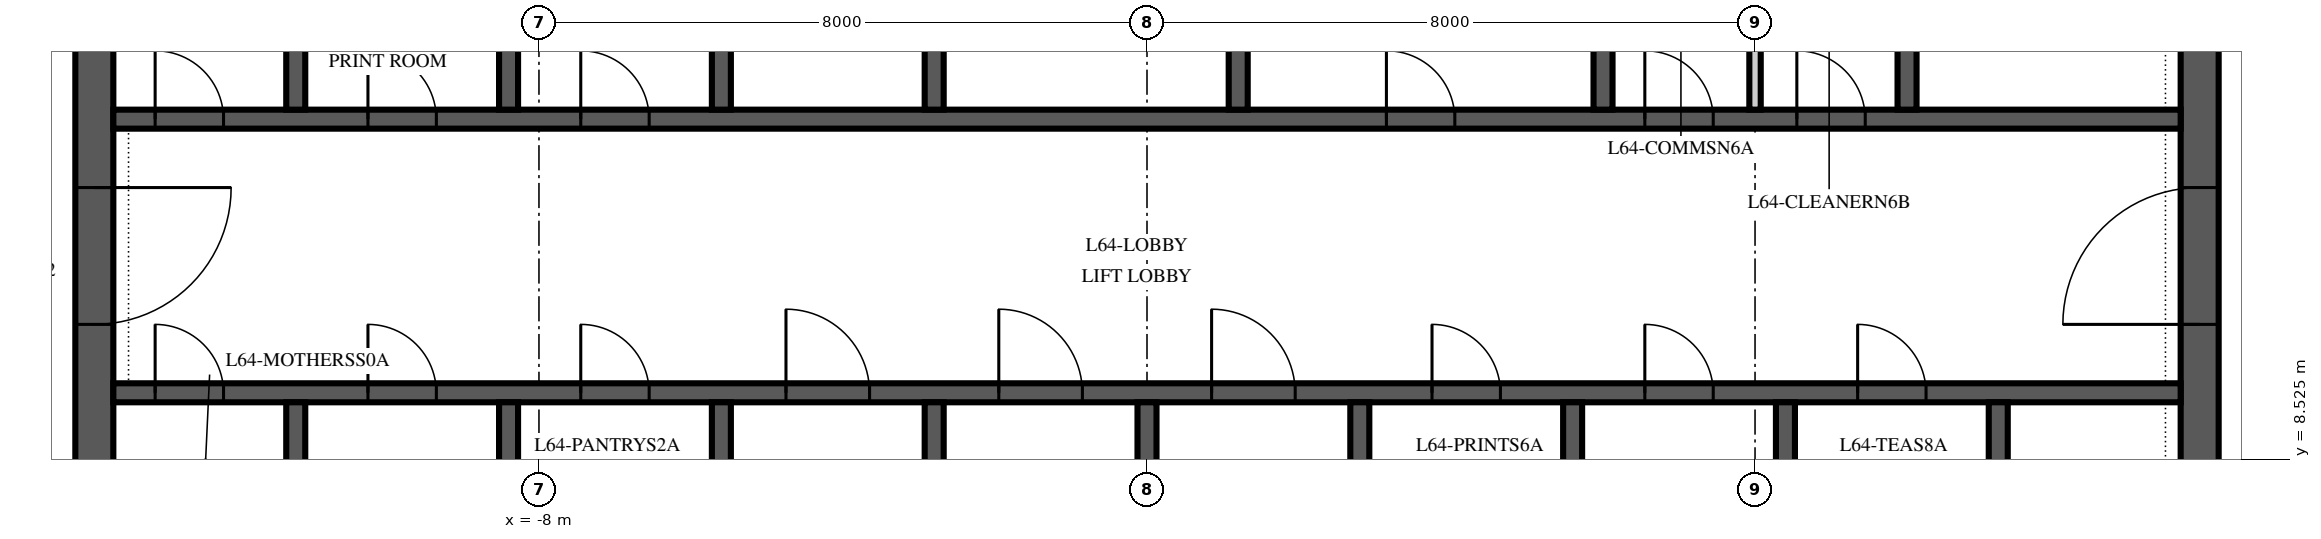
"""IFC4 building model, lengths in metres.
Left out: names, types, materials, properties, quantities, classifications, styles, units other than length and angle.
Written with IfcOpenShell. Run it as: python <this file> out.ifc"""

import sys

from ifc_helpers import new_model, si_unit, direction, frame, frame_2d, origin, place, context, subcontext, project, spatial, polyline, rectangle, outline, extrude, element, fill, save


model = new_model("IFC4")
c1 = context("Model", 3, precision=1e-05, world=origin(), true_north=direction((0.0, 1.0)))
c2 = subcontext(c1, "Body", "Model", "MODEL_VIEW")
j1 = project(units=[si_unit("LENGTHUNIT", "METRE"), si_unit("PLANEANGLEUNIT", "RADIAN")], contexts=[c1])
p1 = place(None, origin())
s1 = spatial("IfcSite", under=j1, at=p1, CompositionType="ELEMENT")
p2 = place(p1, origin())
s2 = spatial("IfcBuilding", under=s1, at=p2, CompositionType="ELEMENT")
p3 = place(p2, frame((0.0, 0.0, 276.0)))
s3 = spatial("IfcBuildingStorey", under=s2, at=p3, CompositionType="ELEMENT", Elevation=276.0)
p4 = place(p3, frame((13.85, 6.15, 0.0), z_axis=(0.0, 0.0, 1.0), x_axis=(0.0, 1.0, 0.0)))
e1 = element("IfcWall", 1, at=p4, inside=s3, PredefinedType="SHEAR", context=c2, shape_type="SweptSolid", body=[
    extrude(outline(polyline([(0.0, -0.25), (17.7, -0.25), (17.7, 0.0), (17.45, 0.0), (17.45, 0.25), (0.25, 0.25), (0.25, 0.0), (0.0, 0.0), (0.0, -0.25)])), origin(), (0.0, 0.0, 1.0), 4.0),
])
p5 = place(p4, frame((4.15, 0.0, 0.0)))
e2 = element("IfcOpeningElement", 2, at=p5, cuts=e1, PredefinedType="OPENING", context=c2, shape_type="SweptSolid", body=[
    extrude(rectangle(XDim=1.8, YDim=2.4, at=frame_2d((0.9, 1.2))), frame((0.0, 0.265, 0.0), z_axis=(0.0, -1.0, 0.0), x_axis=(1.0, 0.0, 0.0)), (0.0, 0.0, 1.0), 0.53),
])
p6 = place(p3, frame((-13.85, 23.85, 0.0), z_axis=(0.0, 0.0, 1.0), x_axis=(0.0, -1.0, 0.0)))
e3 = element("IfcWall", 3, at=p6, inside=s3, PredefinedType="SHEAR", context=c2, shape_type="SweptSolid", body=[
    extrude(outline(polyline([(0.0, -0.25), (17.7, -0.25), (17.7, 0.0), (17.45, 0.0), (17.45, 0.25), (0.25, 0.25), (0.25, 0.0), (0.0, 0.0), (0.0, -0.25)])), origin(), (0.0, 0.0, 1.0), 4.0),
])
p7 = place(p6, frame((11.75, 0.0, 0.0)))
e4 = element("IfcOpeningElement", 4, at=p7, cuts=e3, PredefinedType="OPENING", context=c2, shape_type="SweptSolid", body=[
    extrude(rectangle(XDim=1.8, YDim=2.4, at=frame_2d((0.9, 1.2))), frame((0.0, 0.265, 0.0), z_axis=(0.0, -1.0, 0.0), x_axis=(1.0, 0.0, 0.0)), (0.0, 0.0, 1.0), 0.53),
])
p8 = place(p3, frame((-13.6, 9.4, 0.0), z_axis=(0.0, 0.0, 1.0), x_axis=(1.0, 0.0, 0.0)))
e5 = element("IfcWall", 5, at=p8, inside=s3, PredefinedType="SHEAR", context=c2, shape_type="SweptSolid", body=[
    extrude(rectangle(XDim=27.2, YDim=0.25, at=frame_2d((13.6, 0.0))), origin(), (0.0, 0.0, 1.0), 4.0),
])
p9 = place(p8, frame((8.85, 0.0, 0.0)))
e6 = element("IfcOpeningElement", 6, at=p9, cuts=e5, PredefinedType="OPENING", context=c2, shape_type="SweptSolid", body=[
    extrude(rectangle(XDim=1.1, YDim=2.1, at=frame_2d((0.55, 1.05))), frame((0.0, 0.14, 0.0), z_axis=(0.0, -1.0, 0.0), x_axis=(1.0, 0.0, 0.0)), (0.0, 0.0, 1.0), 0.28),
])
p10 = place(p8, frame((11.65, 0.0, 0.0)))
e7 = element("IfcOpeningElement", 7, at=p10, cuts=e5, PredefinedType="OPENING", context=c2, shape_type="SweptSolid", body=[
    extrude(rectangle(XDim=1.1, YDim=2.1, at=frame_2d((0.55, 1.05))), frame((0.0, 0.14, 0.0), z_axis=(0.0, -1.0, 0.0), x_axis=(1.0, 0.0, 0.0)), (0.0, 0.0, 1.0), 0.28),
])
p11 = place(p8, frame((14.45, 0.0, 0.0)))
e8 = element("IfcOpeningElement", 8, at=p11, cuts=e5, PredefinedType="OPENING", context=c2, shape_type="SweptSolid", body=[
    extrude(rectangle(XDim=1.1, YDim=2.1, at=frame_2d((0.55, 1.05))), frame((0.0, 0.14, 0.0), z_axis=(0.0, -1.0, 0.0), x_axis=(1.0, 0.0, 0.0)), (0.0, 0.0, 1.0), 0.28),
])
p12 = place(p8, frame((0.55, 0.0, 0.0)))
e9 = element("IfcOpeningElement", 9, at=p12, cuts=e5, PredefinedType="OPENING", context=c2, shape_type="SweptSolid", body=[
    extrude(rectangle(XDim=0.9, YDim=2.1, at=frame_2d((0.45, 1.05))), frame((0.0, 0.14, 0.0), z_axis=(0.0, -1.0, 0.0), x_axis=(1.0, 0.0, 0.0)), (0.0, 0.0, 1.0), 0.28),
])
p13 = place(p8, frame((3.35, 0.0, 0.0)))
e10 = element("IfcOpeningElement", 10, at=p13, cuts=e5, PredefinedType="OPENING", context=c2, shape_type="SweptSolid", body=[
    extrude(rectangle(XDim=0.9, YDim=2.1, at=frame_2d((0.45, 1.05))), frame((0.0, 0.14, 0.0), z_axis=(0.0, -1.0, 0.0), x_axis=(1.0, 0.0, 0.0)), (0.0, 0.0, 1.0), 0.28),
])
p14 = place(p8, frame((6.15, 0.0, 0.0)))
e11 = element("IfcOpeningElement", 11, at=p14, cuts=e5, PredefinedType="OPENING", context=c2, shape_type="SweptSolid", body=[
    extrude(rectangle(XDim=0.9, YDim=2.1, at=frame_2d((0.45, 1.05))), frame((0.0, 0.14, 0.0), z_axis=(0.0, -1.0, 0.0), x_axis=(1.0, 0.0, 0.0)), (0.0, 0.0, 1.0), 0.28),
])
p15 = place(p8, frame((17.35, 0.0, 0.0)))
e12 = element("IfcOpeningElement", 12, at=p15, cuts=e5, PredefinedType="OPENING", context=c2, shape_type="SweptSolid", body=[
    extrude(rectangle(XDim=0.9, YDim=2.1, at=frame_2d((0.45, 1.05))), frame((0.0, 0.14, 0.0), z_axis=(0.0, -1.0, 0.0), x_axis=(1.0, 0.0, 0.0)), (0.0, 0.0, 1.0), 0.28),
])
p16 = place(p8, frame((20.15, 0.0, 0.0)))
e13 = element("IfcOpeningElement", 13, at=p16, cuts=e5, PredefinedType="OPENING", context=c2, shape_type="SweptSolid", body=[
    extrude(rectangle(XDim=0.9, YDim=2.1, at=frame_2d((0.45, 1.05))), frame((0.0, 0.14, 0.0), z_axis=(0.0, -1.0, 0.0), x_axis=(1.0, 0.0, 0.0)), (0.0, 0.0, 1.0), 0.28),
])
p17 = place(p8, frame((22.95, 0.0, 0.0)))
e14 = element("IfcOpeningElement", 14, at=p17, cuts=e5, PredefinedType="OPENING", context=c2, shape_type="SweptSolid", body=[
    extrude(rectangle(XDim=0.9, YDim=2.1, at=frame_2d((0.45, 1.05))), frame((0.0, 0.14, 0.0), z_axis=(0.0, -1.0, 0.0), x_axis=(1.0, 0.0, 0.0)), (0.0, 0.0, 1.0), 0.28),
])
p18 = place(p3, frame((-13.6, 13.0, 0.0), z_axis=(0.0, 0.0, 1.0), x_axis=(1.0, 0.0, 0.0)))
e15 = element("IfcWall", 15, at=p18, inside=s3, PredefinedType="SHEAR", context=c2, shape_type="SweptSolid", body=[
    extrude(rectangle(XDim=27.2, YDim=0.25, at=frame_2d((13.6, 0.0))), origin(), (0.0, 0.0, 1.0), 4.0),
])
p19 = place(p18, frame((16.75, 0.0, 0.0)))
e16 = element("IfcOpeningElement", 16, at=p19, cuts=e15, PredefinedType="OPENING", context=c2, shape_type="SweptSolid", body=[
    extrude(rectangle(XDim=0.9, YDim=2.1, at=frame_2d((0.45, 1.05))), frame((0.0, 0.14, 0.0), z_axis=(0.0, -1.0, 0.0), x_axis=(1.0, 0.0, 0.0)), (0.0, 0.0, 1.0), 0.28),
])
p20 = place(p18, frame((20.15, 0.0, 0.0)))
e17 = element("IfcOpeningElement", 17, at=p20, cuts=e15, PredefinedType="OPENING", context=c2, shape_type="SweptSolid", body=[
    extrude(rectangle(XDim=0.9, YDim=2.1, at=frame_2d((0.45, 1.05))), frame((0.0, 0.14, 0.0), z_axis=(0.0, -1.0, 0.0), x_axis=(1.0, 0.0, 0.0)), (0.0, 0.0, 1.0), 0.28),
])
p21 = place(p18, frame((22.15, 0.0, 0.0)))
e18 = element("IfcOpeningElement", 18, at=p21, cuts=e15, PredefinedType="OPENING", context=c2, shape_type="SweptSolid", body=[
    extrude(rectangle(XDim=0.9, YDim=2.1, at=frame_2d((0.45, 1.05))), frame((0.0, 0.14, 0.0), z_axis=(0.0, -1.0, 0.0), x_axis=(1.0, 0.0, 0.0)), (0.0, 0.0, 1.0), 0.28),
])
p22 = place(p18, frame((0.55, 0.0, 0.0)))
e19 = element("IfcOpeningElement", 19, at=p22, cuts=e15, PredefinedType="OPENING", context=c2, shape_type="SweptSolid", body=[
    extrude(rectangle(XDim=0.9, YDim=2.1, at=frame_2d((0.45, 1.05))), frame((0.0, 0.14, 0.0), z_axis=(0.0, -1.0, 0.0), x_axis=(1.0, 0.0, 0.0)), (0.0, 0.0, 1.0), 0.28),
])
p23 = place(p18, frame((3.35, 0.0, 0.0)))
e20 = element("IfcOpeningElement", 20, at=p23, cuts=e15, PredefinedType="OPENING", context=c2, shape_type="SweptSolid", body=[
    extrude(rectangle(XDim=0.9, YDim=2.1, at=frame_2d((0.45, 1.05))), frame((0.0, 0.14, 0.0), z_axis=(0.0, -1.0, 0.0), x_axis=(1.0, 0.0, 0.0)), (0.0, 0.0, 1.0), 0.28),
])
p24 = place(p18, frame((6.15, 0.0, 0.0)))
e21 = element("IfcOpeningElement", 21, at=p24, cuts=e15, PredefinedType="OPENING", context=c2, shape_type="SweptSolid", body=[
    extrude(rectangle(XDim=0.9, YDim=2.1, at=frame_2d((0.45, 1.05))), frame((0.0, 0.14, 0.0), z_axis=(0.0, -1.0, 0.0), x_axis=(1.0, 0.0, 0.0)), (0.0, 0.0, 1.0), 0.28),
])
for number, where, z_axis, x_axis in (
    (22, (-11.2, 6.4, 0.0), (0.0, 0.0, 1.0), (0.0, 1.0, 0.0)),
    (23, (-8.4, 6.4, 0.0), (0.0, 0.0, 1.0), (0.0, 1.0, 0.0)),
    (24, (-5.6, 6.4, 0.0), (0.0, 0.0, 1.0), (0.0, 1.0, 0.0)),
    (25, (-2.8, 6.4, 0.0), (0.0, 0.0, 1.0), (0.0, 1.0, 0.0)),
    (26, (0.0, 6.4, 0.0), (0.0, 0.0, 1.0), (0.0, 1.0, 0.0)),
    (27, (2.8, 6.4, 0.0), (0.0, 0.0, 1.0), (0.0, 1.0, 0.0)),
    (28, (5.6, 6.4, 0.0), (0.0, 0.0, 1.0), (0.0, 1.0, 0.0)),
    (29, (8.4, 6.4, 0.0), (0.0, 0.0, 1.0), (0.0, 1.0, 0.0)),
    (30, (11.2, 6.4, 0.0), (0.0, 0.0, 1.0), (0.0, 1.0, 0.0)),
):
    element("IfcWall", number, at=place(p3, frame(where, z_axis=z_axis, x_axis=x_axis)), inside=s3, PredefinedType="SHEAR", context=c2, shape_type="SweptSolid", body=[
        extrude(rectangle(XDim=2.875, YDim=0.25, at=frame_2d((1.438, 0.0))), origin(), (0.0, 0.0, 1.0), 4.0),
    ])
for number, where, z_axis, x_axis in (
    (31, (-11.2, 13.125, 0.0), (0.0, 0.0, 1.0), (0.0, 1.0, 0.0)),
    (32, (-8.4, 13.125, 0.0), (0.0, 0.0, 1.0), (0.0, 1.0, 0.0)),
    (33, (-5.6, 13.125, 0.0), (0.0, 0.0, 1.0), (0.0, 1.0, 0.0)),
    (34, (-2.8, 13.125, 0.0), (0.0, 0.0, 1.0), (0.0, 1.0, 0.0)),
    (35, (1.2, 13.125, 0.0), (0.0, 0.0, 1.0), (0.0, 1.0, 0.0)),
    (36, (6.0, 13.125, 0.0), (0.0, 0.0, 1.0), (0.0, 1.0, 0.0)),
    (37, (10.0, 13.125, 0.0), (0.0, 0.0, 1.0), (0.0, 1.0, 0.0)),
):
    element("IfcWall", number, at=place(p3, frame(where, z_axis=z_axis, x_axis=x_axis)), inside=s3, PredefinedType="SHEAR", context=c2, shape_type="SweptSolid", body=[
        extrude(rectangle(XDim=2.75, YDim=0.25, at=frame_2d((1.375, 0.0))), origin(), (0.0, 0.0, 1.0), 4.0),
    ])
p25 = place(p3, frame((8.0, 13.125, 0.0), z_axis=(0.0, 0.0, 1.0), x_axis=(0.0, 1.0, 0.0)))
e38 = element("IfcWall", 38, at=p25, inside=s3, PredefinedType="PARTITIONING", context=c2, shape_type="SweptSolid", body=[
    extrude(rectangle(XDim=2.75, YDim=0.15, at=frame_2d((1.375, 0.0))), origin(), (0.0, 0.0, 1.0), 3.85),
])
p26 = place(p5, origin())
e39 = element("IfcDoor", 39, at=p26, inside=s3, OperationType="DOUBLE_DOOR_SINGLE_SWING", PredefinedType="DOOR", context=c2, shape_type="SweptSolid", body=[
    extrude(rectangle(XDim=1.8, YDim=2.4, at=frame_2d((0.9, 1.2))), frame((0.0, 0.25, 0.0), z_axis=(0.0, -1.0, 0.0), x_axis=(1.0, 0.0, 0.0)), (0.0, 0.0, 1.0), 0.5),
])
fill(e2, e39)
p27 = place(p7, origin())
e40 = element("IfcDoor", 40, at=p27, inside=s3, OperationType="DOUBLE_DOOR_SINGLE_SWING", PredefinedType="DOOR", context=c2, shape_type="SweptSolid", body=[
    extrude(rectangle(XDim=1.8, YDim=2.4, at=frame_2d((0.9, 1.2))), frame((0.0, 0.25, 0.0), z_axis=(0.0, -1.0, 0.0), x_axis=(1.0, 0.0, 0.0)), (0.0, 0.0, 1.0), 0.5),
])
fill(e4, e40)
p28 = place(p9, origin())
e41 = element("IfcDoor", 41, at=p28, inside=s3, OperationType="SLIDING_TO_LEFT", PredefinedType="DOOR", context=c2, shape_type="SweptSolid", body=[
    extrude(rectangle(XDim=1.1, YDim=2.1, at=frame_2d((0.55, 1.05))), frame((0.0, 0.125, 0.0), z_axis=(0.0, -1.0, 0.0), x_axis=(1.0, 0.0, 0.0)), (0.0, 0.0, 1.0), 0.25),
])
fill(e6, e41)
p29 = place(p10, origin())
e42 = element("IfcDoor", 42, at=p29, inside=s3, OperationType="SLIDING_TO_LEFT", PredefinedType="DOOR", context=c2, shape_type="SweptSolid", body=[
    extrude(rectangle(XDim=1.1, YDim=2.1, at=frame_2d((0.55, 1.05))), frame((0.0, 0.125, 0.0), z_axis=(0.0, -1.0, 0.0), x_axis=(1.0, 0.0, 0.0)), (0.0, 0.0, 1.0), 0.25),
])
fill(e7, e42)
p30 = place(p11, origin())
e43 = element("IfcDoor", 43, at=p30, inside=s3, OperationType="SLIDING_TO_LEFT", PredefinedType="DOOR", context=c2, shape_type="SweptSolid", body=[
    extrude(rectangle(XDim=1.1, YDim=2.1, at=frame_2d((0.55, 1.05))), frame((0.0, 0.125, 0.0), z_axis=(0.0, -1.0, 0.0), x_axis=(1.0, 0.0, 0.0)), (0.0, 0.0, 1.0), 0.25),
])
fill(e8, e43)
p31 = place(p19, origin())
e44 = element("IfcDoor", 44, at=p31, inside=s3, OperationType="SINGLE_SWING_LEFT", PredefinedType="DOOR", context=c2, shape_type="SweptSolid", body=[
    extrude(rectangle(XDim=0.9, YDim=2.1, at=frame_2d((0.45, 1.05))), frame((0.0, 0.125, 0.0), z_axis=(0.0, -1.0, 0.0), x_axis=(1.0, 0.0, 0.0)), (0.0, 0.0, 1.0), 0.25),
])
fill(e16, e44)
p32 = place(p20, origin())
e45 = element("IfcDoor", 45, at=p32, inside=s3, OperationType="SINGLE_SWING_LEFT", PredefinedType="DOOR", context=c2, shape_type="SweptSolid", body=[
    extrude(rectangle(XDim=0.9, YDim=2.1, at=frame_2d((0.45, 1.05))), frame((0.0, 0.125, 0.0), z_axis=(0.0, -1.0, 0.0), x_axis=(1.0, 0.0, 0.0)), (0.0, 0.0, 1.0), 0.25),
])
fill(e17, e45)
p33 = place(p21, origin())
e46 = element("IfcDoor", 46, at=p33, inside=s3, OperationType="SINGLE_SWING_LEFT", PredefinedType="DOOR", context=c2, shape_type="SweptSolid", body=[
    extrude(rectangle(XDim=0.9, YDim=2.1, at=frame_2d((0.45, 1.05))), frame((0.0, 0.125, 0.0), z_axis=(0.0, -1.0, 0.0), x_axis=(1.0, 0.0, 0.0)), (0.0, 0.0, 1.0), 0.25),
])
fill(e18, e46)
p34 = place(p22, origin())
e47 = element("IfcDoor", 47, at=p34, inside=s3, OperationType="SINGLE_SWING_LEFT", PredefinedType="DOOR", context=c2, shape_type="SweptSolid", body=[
    extrude(rectangle(XDim=0.9, YDim=2.1, at=frame_2d((0.45, 1.05))), frame((0.0, 0.125, 0.0), z_axis=(0.0, -1.0, 0.0), x_axis=(1.0, 0.0, 0.0)), (0.0, 0.0, 1.0), 0.25),
])
fill(e19, e47)
p35 = place(p23, origin())
e48 = element("IfcDoor", 48, at=p35, inside=s3, OperationType="SINGLE_SWING_LEFT", PredefinedType="DOOR", context=c2, shape_type="SweptSolid", body=[
    extrude(rectangle(XDim=0.9, YDim=2.1, at=frame_2d((0.45, 1.05))), frame((0.0, 0.125, 0.0), z_axis=(0.0, -1.0, 0.0), x_axis=(1.0, 0.0, 0.0)), (0.0, 0.0, 1.0), 0.25),
])
fill(e20, e48)
p36 = place(p24, origin())
e49 = element("IfcDoor", 49, at=p36, inside=s3, OperationType="SINGLE_SWING_LEFT", PredefinedType="DOOR", context=c2, shape_type="SweptSolid", body=[
    extrude(rectangle(XDim=0.9, YDim=2.1, at=frame_2d((0.45, 1.05))), frame((0.0, 0.125, 0.0), z_axis=(0.0, -1.0, 0.0), x_axis=(1.0, 0.0, 0.0)), (0.0, 0.0, 1.0), 0.25),
])
fill(e21, e49)
p37 = place(p12, origin())
e50 = element("IfcDoor", 50, at=p37, inside=s3, OperationType="SINGLE_SWING_LEFT", PredefinedType="DOOR", context=c2, shape_type="SweptSolid", body=[
    extrude(rectangle(XDim=0.9, YDim=2.1, at=frame_2d((0.45, 1.05))), frame((0.0, 0.125, 0.0), z_axis=(0.0, -1.0, 0.0), x_axis=(1.0, 0.0, 0.0)), (0.0, 0.0, 1.0), 0.25),
])
fill(e9, e50)
p38 = place(p13, origin())
e51 = element("IfcDoor", 51, at=p38, inside=s3, OperationType="SINGLE_SWING_LEFT", PredefinedType="DOOR", context=c2, shape_type="SweptSolid", body=[
    extrude(rectangle(XDim=0.9, YDim=2.1, at=frame_2d((0.45, 1.05))), frame((0.0, 0.125, 0.0), z_axis=(0.0, -1.0, 0.0), x_axis=(1.0, 0.0, 0.0)), (0.0, 0.0, 1.0), 0.25),
])
fill(e10, e51)
p39 = place(p14, origin())
e52 = element("IfcDoor", 52, at=p39, inside=s3, OperationType="SINGLE_SWING_LEFT", PredefinedType="DOOR", context=c2, shape_type="SweptSolid", body=[
    extrude(rectangle(XDim=0.9, YDim=2.1, at=frame_2d((0.45, 1.05))), frame((0.0, 0.125, 0.0), z_axis=(0.0, -1.0, 0.0), x_axis=(1.0, 0.0, 0.0)), (0.0, 0.0, 1.0), 0.25),
])
fill(e11, e52)
p40 = place(p15, origin())
e53 = element("IfcDoor", 53, at=p40, inside=s3, OperationType="SINGLE_SWING_LEFT", PredefinedType="DOOR", context=c2, shape_type="SweptSolid", body=[
    extrude(rectangle(XDim=0.9, YDim=2.1, at=frame_2d((0.45, 1.05))), frame((0.0, 0.125, 0.0), z_axis=(0.0, -1.0, 0.0), x_axis=(1.0, 0.0, 0.0)), (0.0, 0.0, 1.0), 0.25),
])
fill(e12, e53)
p41 = place(p16, origin())
e54 = element("IfcDoor", 54, at=p41, inside=s3, OperationType="SINGLE_SWING_LEFT", PredefinedType="DOOR", context=c2, shape_type="SweptSolid", body=[
    extrude(rectangle(XDim=0.9, YDim=2.1, at=frame_2d((0.45, 1.05))), frame((0.0, 0.125, 0.0), z_axis=(0.0, -1.0, 0.0), x_axis=(1.0, 0.0, 0.0)), (0.0, 0.0, 1.0), 0.25),
])
fill(e13, e54)
p42 = place(p17, origin())
e55 = element("IfcDoor", 55, at=p42, inside=s3, OperationType="SINGLE_SWING_LEFT", PredefinedType="DOOR", context=c2, shape_type="SweptSolid", body=[
    extrude(rectangle(XDim=0.9, YDim=2.1, at=frame_2d((0.45, 1.05))), frame((0.0, 0.125, 0.0), z_axis=(0.0, -1.0, 0.0), x_axis=(1.0, 0.0, 0.0)), (0.0, 0.0, 1.0), 0.25),
])
fill(e14, e55)
save(model, sys.argv[1])
